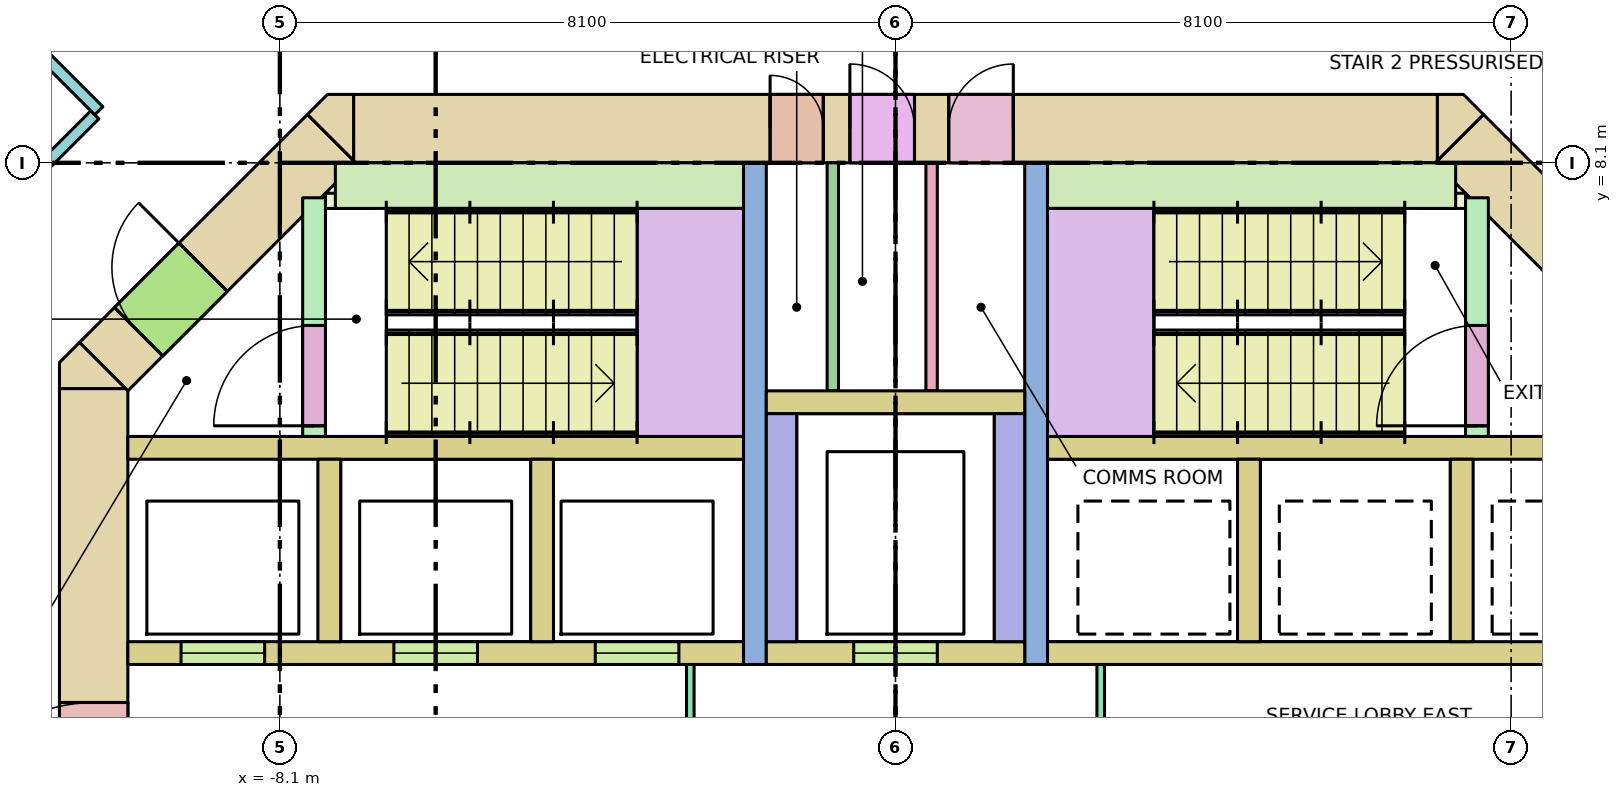
"""IFC4 building model, lengths in metres.
Left out: names, types, materials, properties, quantities, classifications, styles, units other than length and angle.
Written with IfcOpenShell. Run it as: python <this file> out.ifc"""

import sys

from ifc_helpers import new_model, si_unit, direction, frame, frame_2d, origin, place, context, subcontext, project, spatial, polyline, rectangle, outline, extrude, element, fill, save


model = new_model("IFC4")
c1 = context("Model", 3, precision=1e-05, world=origin(), true_north=direction((0.0, 1.0)))
c2 = subcontext(c1, "Body", "Model", "MODEL_VIEW")
j1 = project(units=[si_unit("LENGTHUNIT", "METRE"), si_unit("PLANEANGLEUNIT", "RADIAN")], contexts=[c1])
p1 = place(None, origin())
s1 = spatial("IfcSite", under=j1, at=p1, CompositionType="ELEMENT")
p2 = place(p1, origin())
s2 = spatial("IfcBuilding", under=s1, at=p2, CompositionType="ELEMENT")
p3 = place(p2, frame((0.0, 0.0, 71.0)))
s3 = spatial("IfcBuildingStorey", under=s2, at=p3, CompositionType="ELEMENT", Elevation=71.0)
p4 = place(p3, frame((-7.13, 8.55, -0.28), z_axis=(0.0, 0.0, 1.0), x_axis=(1.0, 0.0, 0.0)))
e1 = element("IfcWall", 1, at=p4, inside=s3, PredefinedType="SHEAR", context=c2, shape_type="SweptSolid", body=[
    extrude(rectangle(XDim=14.26, YDim=0.9, at=frame_2d((7.13, 0.0))), origin(), (0.0, 0.0, 1.0), 4.0),
])
p5 = place(p4, frame((5.48, 0.0, 0.28)))
e2 = element("IfcOpeningElement", 2, at=p5, cuts=e1, PredefinedType="OPENING", context=c2, shape_type="SweptSolid", body=[
    extrude(rectangle(XDim=0.7, YDim=2.1, at=frame_2d((0.35, 1.05))), frame((0.0, 0.46, 0.0), z_axis=(0.0, -1.0, 0.0), x_axis=(1.0, 0.0, 0.0)), (0.0, 0.0, 1.0), 0.92),
])
p6 = place(p4, frame((6.53, 0.0, 0.28)))
e3 = element("IfcOpeningElement", 3, at=p6, cuts=e1, PredefinedType="OPENING", context=c2, shape_type="SweptSolid", body=[
    extrude(rectangle(XDim=0.85, YDim=2.1, at=frame_2d((0.425, 1.05))), frame((0.0, 0.46, 0.0), z_axis=(0.0, -1.0, 0.0), x_axis=(1.0, 0.0, 0.0)), (0.0, 0.0, 1.0), 0.92),
])
p7 = place(p4, frame((7.83, 0.0, 0.28)))
e4 = element("IfcOpeningElement", 4, at=p7, cuts=e1, PredefinedType="OPENING", context=c2, shape_type="SweptSolid", body=[
    extrude(rectangle(XDim=0.85, YDim=2.1, at=frame_2d((0.425, 1.05))), frame((0.0, 0.46, 0.0), z_axis=(0.0, -1.0, 0.0), x_axis=(1.0, 0.0, 0.0)), (0.0, 0.0, 1.0), 0.92),
])
p8 = place(p3, frame((-10.55, -5.13, -0.28), z_axis=(0.0, 0.0, 1.0), x_axis=(0.0, 1.0, 0.0)))
e5 = element("IfcWall", 5, at=p8, inside=s3, PredefinedType="SHEAR", context=c2, shape_type="SweptSolid", body=[
    extrude(rectangle(XDim=10.26, YDim=0.9, at=frame_2d((5.13, 0.0))), origin(), (0.0, 0.0, 1.0), 4.0),
])
p9 = place(p8, frame((4.13, 0.0, 0.28)))
e6 = element("IfcOpeningElement", 6, at=p9, cuts=e5, PredefinedType="OPENING", context=c2, shape_type="SweptSolid", body=[
    extrude(rectangle(XDim=2.0, YDim=2.1, at=frame_2d((1.0, 1.05))), frame((0.0, 0.46, 0.0), z_axis=(0.0, -1.0, 0.0), x_axis=(1.0, 0.0, 0.0)), (0.0, 0.0, 1.0), 0.92),
])
p10 = place(p3, frame((-10.418, 5.418, -0.28), z_axis=(0.0, 0.0, 1.0), x_axis=(0.707106781187, 0.707106781187, 0.0)))
e7 = element("IfcWall", 7, at=p10, inside=s3, PredefinedType="SHEAR", context=c2, shape_type="SweptSolid", body=[
    extrude(rectangle(XDim=4.243, YDim=0.9, at=frame_2d((2.121, 0.0))), origin(), (0.0, 0.0, 1.0), 4.0),
])
p11 = place(p10, frame((0.65, 0.0, 0.28)))
e8 = element("IfcOpeningElement", 8, at=p11, cuts=e7, PredefinedType="OPENING", context=c2, shape_type="SweptSolid", body=[
    extrude(rectangle(XDim=1.2, YDim=2.1, at=frame_2d((0.6, 1.05))), frame((0.0, 0.46, 0.0), z_axis=(0.0, -1.0, 0.0), x_axis=(1.0, 0.0, 0.0)), (0.0, 0.0, 1.0), 0.92),
])
p12 = place(p3, frame((7.418, 8.418, -0.28), z_axis=(0.0, 0.0, 1.0), x_axis=(0.707106781187, -0.707106781187, 0.0)))
e9 = element("IfcWall", 9, at=p12, inside=s3, PredefinedType="SHEAR", context=c2, shape_type="SweptSolid", body=[
    extrude(rectangle(XDim=4.243, YDim=0.9, at=frame_2d((2.121, 0.0))), origin(), (0.0, 0.0, 1.0), 4.0),
])
p13 = place(p12, frame((2.393, 0.0, 0.28)))
e10 = element("IfcOpeningElement", 10, at=p13, cuts=e9, PredefinedType="OPENING", context=c2, shape_type="SweptSolid", body=[
    extrude(rectangle(XDim=1.2, YDim=2.1, at=frame_2d((0.6, 1.05))), frame((0.0, 0.46, 0.0), z_axis=(0.0, -1.0, 0.0), x_axis=(1.0, 0.0, 0.0)), (0.0, 0.0, 1.0), 0.92),
])
p14 = place(p3, frame((0.0, 0.0, -0.28)))
e11 = element("IfcWall", 11, at=p14, inside=s3, PredefinedType="SHEAR", context=c2, shape_type="SweptSolid", body=[
    extrude(outline(polyline([(-10.736, 5.736), (-10.13, 5.13), (-11.0, 5.13), (-11.0, 5.473), (-10.736, 5.736)])), origin(), (0.0, 0.0, 1.0), 4.0),
])
p15 = place(p3, frame((0.0, 0.0, -0.28)))
e12 = element("IfcWall", 12, at=p15, inside=s3, PredefinedType="SHEAR", context=c2, shape_type="SweptSolid", body=[
    extrude(outline(polyline([(-7.473, 9.0), (-7.13, 9.0), (-7.13, 8.13), (-7.736, 8.736), (-7.473, 9.0)])), origin(), (0.0, 0.0, 1.0), 4.0),
])
p16 = place(p3, frame((0.0, 0.0, -0.28)))
e13 = element("IfcWall", 13, at=p16, inside=s3, PredefinedType="SHEAR", context=c2, shape_type="SweptSolid", body=[
    extrude(outline(polyline([(7.473, 9.0), (7.736, 8.736), (7.13, 8.13), (7.13, 9.0), (7.473, 9.0)])), origin(), (0.0, 0.0, 1.0), 4.0),
])
for number, where, z_axis, x_axis in (
    (14, (-10.1, 4.35, 0.0), (0.0, 0.0, 1.0), (1.0, 0.0, 0.0)),
    (15, (2.0, 4.35, 0.0), (0.0, 0.0, 1.0), (1.0, 0.0, 0.0)),
):
    element("IfcWall", number, at=place(p3, frame(where, z_axis=z_axis, x_axis=x_axis)), inside=s3, PredefinedType="SOLIDWALL", context=c2, shape_type="SweptSolid", body=[
        extrude(rectangle(XDim=8.1, YDim=0.3, at=frame_2d((4.05, 0.0))), origin(), (0.0, 0.0, 1.0), 3.72),
    ])
p17 = place(p3, frame((-10.1, 1.65, 0.0), z_axis=(0.0, 0.0, 1.0), x_axis=(1.0, 0.0, 0.0)))
e16 = element("IfcWall", 16, at=p17, inside=s3, PredefinedType="SOLIDWALL", context=c2, shape_type="SweptSolid", body=[
    extrude(rectangle(XDim=8.1, YDim=0.3, at=frame_2d((4.05, 0.0))), origin(), (0.0, 0.0, 1.0), 3.72),
])
p18 = place(p17, frame((0.7, 0.0, 0.0)))
e17 = element("IfcOpeningElement", 17, at=p18, cuts=e16, PredefinedType="OPENING", context=c2, shape_type="SweptSolid", body=[
    extrude(rectangle(XDim=1.1, YDim=2.1, at=frame_2d((0.55, 1.05))), frame((0.0, 0.16, 0.0), z_axis=(0.0, -1.0, 0.0), x_axis=(1.0, 0.0, 0.0)), (0.0, 0.0, 1.0), 0.32),
])
p19 = place(p17, frame((3.5, 0.0, 0.0)))
e18 = element("IfcOpeningElement", 18, at=p19, cuts=e16, PredefinedType="OPENING", context=c2, shape_type="SweptSolid", body=[
    extrude(rectangle(XDim=1.1, YDim=2.1, at=frame_2d((0.55, 1.05))), frame((0.0, 0.16, 0.0), z_axis=(0.0, -1.0, 0.0), x_axis=(1.0, 0.0, 0.0)), (0.0, 0.0, 1.0), 0.32),
])
p20 = place(p17, frame((6.15, 0.0, 0.0)))
e19 = element("IfcOpeningElement", 19, at=p20, cuts=e16, PredefinedType="OPENING", context=c2, shape_type="SweptSolid", body=[
    extrude(rectangle(XDim=1.1, YDim=2.1, at=frame_2d((0.55, 1.05))), frame((0.0, 0.16, 0.0), z_axis=(0.0, -1.0, 0.0), x_axis=(1.0, 0.0, 0.0)), (0.0, 0.0, 1.0), 0.32),
])
p21 = place(p3, frame((2.0, 1.65, 0.0), z_axis=(0.0, 0.0, 1.0), x_axis=(1.0, 0.0, 0.0)))
e20 = element("IfcWall", 20, at=p21, inside=s3, PredefinedType="SOLIDWALL", context=c2, shape_type="SweptSolid", body=[
    extrude(rectangle(XDim=8.1, YDim=0.3, at=frame_2d((4.05, 0.0))), origin(), (0.0, 0.0, 1.0), 3.72),
])
for number, where, z_axis, x_axis in (
    (21, (-7.45, 1.8, 0.0), (0.0, 0.0, 1.0), (0.0, 1.0, 0.0)),
    (22, (-4.65, 1.8, 0.0), (0.0, 0.0, 1.0), (0.0, 1.0, 0.0)),
    (23, (4.65, 1.8, 0.0), (0.0, 0.0, 1.0), (0.0, 1.0, 0.0)),
    (24, (7.45, 1.8, 0.0), (0.0, 0.0, 1.0), (0.0, 1.0, 0.0)),
):
    element("IfcWall", number, at=place(p3, frame(where, z_axis=z_axis, x_axis=x_axis)), inside=s3, PredefinedType="SOLIDWALL", context=c2, shape_type="SweptSolid", body=[
        extrude(rectangle(XDim=2.4, YDim=0.3, at=frame_2d((1.2, 0.0))), origin(), (0.0, 0.0, 1.0), 3.72),
    ])
for number, where, z_axis, x_axis in (
    (25, (-1.85, 1.5, 0.0), (0.0, 0.0, 1.0), (0.0, 1.0, 0.0)),
    (26, (1.85, 1.5, 0.0), (0.0, 0.0, 1.0), (0.0, 1.0, 0.0)),
):
    element("IfcWall", number, at=place(p3, frame(where, z_axis=z_axis, x_axis=x_axis)), inside=s3, PredefinedType="SHEAR", context=c2, shape_type="SweptSolid", body=[
        extrude(rectangle(XDim=6.6, YDim=0.3, at=frame_2d((3.3, 0.0))), origin(), (0.0, 0.0, 1.0), 3.72),
    ])
p22 = place(p3, frame((-1.7, 1.65, 0.0), z_axis=(0.0, 0.0, 1.0), x_axis=(1.0, 0.0, 0.0)))
e27 = element("IfcWall", 27, at=p22, inside=s3, PredefinedType="SOLIDWALL", context=c2, shape_type="SweptSolid", body=[
    extrude(rectangle(XDim=3.4, YDim=0.3, at=frame_2d((1.7, 0.0))), origin(), (0.0, 0.0, 1.0), 3.72),
])
p23 = place(p22, frame((1.15, 0.0, 0.0)))
e28 = element("IfcOpeningElement", 28, at=p23, cuts=e27, PredefinedType="OPENING", context=c2, shape_type="SweptSolid", body=[
    extrude(rectangle(XDim=1.1, YDim=2.1, at=frame_2d((0.55, 1.05))), frame((0.0, 0.16, 0.0), z_axis=(0.0, -1.0, 0.0), x_axis=(1.0, 0.0, 0.0)), (0.0, 0.0, 1.0), 0.32),
])
for number, where, z_axis, x_axis in (
    (29, (-1.5, 1.8, 0.0), (0.0, 0.0, 1.0), (0.0, 1.0, 0.0)),
    (30, (1.5, 1.8, 0.0), (0.0, 0.0, 1.0), (0.0, 1.0, 0.0)),
):
    element("IfcWall", number, at=place(p3, frame(where, z_axis=z_axis, x_axis=x_axis)), inside=s3, PredefinedType="SOLIDWALL", context=c2, shape_type="SweptSolid", body=[
        extrude(rectangle(XDim=3.0, YDim=0.4, at=frame_2d((1.5, 0.0))), origin(), (0.0, 0.0, 1.0), 3.72),
    ])
p24 = place(p3, frame((-1.7, 4.95, 0.0), z_axis=(0.0, 0.0, 1.0), x_axis=(1.0, 0.0, 0.0)))
e31 = element("IfcWall", 31, at=p24, inside=s3, PredefinedType="SOLIDWALL", context=c2, shape_type="SweptSolid", body=[
    extrude(rectangle(XDim=3.4, YDim=0.3, at=frame_2d((1.7, 0.0))), origin(), (0.0, 0.0, 1.0), 3.72),
])
p25 = place(p3, frame((-7.65, 4.5, 0.0), z_axis=(0.0, 0.0, 1.0), x_axis=(0.0, 1.0, 0.0)))
e32 = element("IfcWall", 32, at=p25, inside=s3, PredefinedType="SHEAR", context=c2, shape_type="SweptSolid", body=[
    extrude(rectangle(XDim=3.14, YDim=0.3, at=frame_2d((1.57, 0.0))), origin(), (0.0, 0.0, 1.0), 3.72),
])
p26 = place(p25, frame((0.14, 0.0, 0.0)))
e33 = element("IfcOpeningElement", 33, at=p26, cuts=e32, PredefinedType="OPENING", context=c2, shape_type="SweptSolid", body=[
    extrude(rectangle(XDim=1.32, YDim=2.1, at=frame_2d((0.66, 1.05))), frame((0.0, 0.16, 0.0), z_axis=(0.0, -1.0, 0.0), x_axis=(1.0, 0.0, 0.0)), (0.0, 0.0, 1.0), 0.32),
])
p27 = place(p3, frame((-7.37, 7.8, 0.0), z_axis=(0.0, 0.0, 1.0), x_axis=(1.0, 0.0, 0.0)))
e34 = element("IfcWall", 34, at=p27, inside=s3, PredefinedType="SHEAR", context=c2, shape_type="SweptSolid", body=[
    extrude(rectangle(XDim=5.37, YDim=0.6, at=frame_2d((2.685, 0.0))), origin(), (0.0, 0.0, 1.0), 3.72),
])
p28 = place(p3, frame((7.65, 4.5, 0.0), z_axis=(0.0, 0.0, 1.0), x_axis=(0.0, 1.0, 0.0)))
e35 = element("IfcWall", 35, at=p28, inside=s3, PredefinedType="SHEAR", context=c2, shape_type="SweptSolid", body=[
    extrude(rectangle(XDim=3.14, YDim=0.3, at=frame_2d((1.57, 0.0))), origin(), (0.0, 0.0, 1.0), 3.72),
])
p29 = place(p28, frame((0.14, 0.0, 0.0)))
e36 = element("IfcOpeningElement", 36, at=p29, cuts=e35, PredefinedType="OPENING", context=c2, shape_type="SweptSolid", body=[
    extrude(rectangle(XDim=1.32, YDim=2.1, at=frame_2d((0.66, 1.05))), frame((0.0, 0.16, 0.0), z_axis=(0.0, -1.0, 0.0), x_axis=(1.0, 0.0, 0.0)), (0.0, 0.0, 1.0), 0.32),
])
p30 = place(p3, frame((2.0, 7.8, 0.0), z_axis=(0.0, 0.0, 1.0), x_axis=(1.0, 0.0, 0.0)))
e37 = element("IfcWall", 37, at=p30, inside=s3, PredefinedType="SHEAR", context=c2, shape_type="SweptSolid", body=[
    extrude(rectangle(XDim=5.37, YDim=0.6, at=frame_2d((2.685, 0.0))), origin(), (0.0, 0.0, 1.0), 3.72),
])
for number, where, z_axis, x_axis in (
    (38, (-7.5, 7.6, 0.0), (0.0, 0.0, 1.0), (1.0, 0.0, 0.0)),
    (39, (6.9, 7.6, 0.0), (0.0, 0.0, 1.0), (1.0, 0.0, 0.0)),
):
    element("IfcWall", number, at=place(p3, frame(where, z_axis=z_axis, x_axis=x_axis)), inside=s3, PredefinedType="SHEAR", context=c2, shape_type="SweptSolid", body=[
        extrude(rectangle(XDim=0.6, YDim=0.2, at=frame_2d((0.3, 0.0))), origin(), (0.0, 0.0, 1.0), 3.72),
    ])
p31 = place(p3, frame((-2.7, -1.5, 0.0), z_axis=(0.0, 0.0, 1.0), x_axis=(0.0, 1.0, 0.0)))
e40 = element("IfcWall", 40, at=p31, inside=s3, PredefinedType="PARTITIONING", context=c2, shape_type="SweptSolid", body=[
    extrude(rectangle(XDim=3.0, YDim=0.1, at=frame_2d((1.5, 0.0))), origin(), (0.0, 0.0, 1.0), 3.72),
])
p32 = place(p31, frame((0.9, 0.0, 0.0)))
e41 = element("IfcOpeningElement", 41, at=p32, cuts=e40, PredefinedType="OPENING", context=c2, shape_type="SweptSolid", body=[
    extrude(rectangle(XDim=1.2, YDim=2.1, at=frame_2d((0.6, 1.05))), frame((0.0, 0.06, 0.0), z_axis=(0.0, -1.0, 0.0), x_axis=(1.0, 0.0, 0.0)), (0.0, 0.0, 1.0), 0.12),
])
p33 = place(p3, frame((2.7, -1.5, 0.0), z_axis=(0.0, 0.0, 1.0), x_axis=(0.0, 1.0, 0.0)))
e42 = element("IfcWall", 42, at=p33, inside=s3, PredefinedType="PARTITIONING", context=c2, shape_type="SweptSolid", body=[
    extrude(rectangle(XDim=3.0, YDim=0.1, at=frame_2d((1.5, 0.0))), origin(), (0.0, 0.0, 1.0), 3.72),
])
p34 = place(p33, frame((0.9, 0.0, 0.0)))
e43 = element("IfcOpeningElement", 43, at=p34, cuts=e42, PredefinedType="OPENING", context=c2, shape_type="SweptSolid", body=[
    extrude(rectangle(XDim=1.2, YDim=2.1, at=frame_2d((0.6, 1.05))), frame((0.0, 0.06, 0.0), z_axis=(0.0, -1.0, 0.0), x_axis=(1.0, 0.0, 0.0)), (0.0, 0.0, 1.0), 0.12),
])
for number, where, z_axis, x_axis in (
    (44, (-0.825, 5.1, 0.0), (0.0, 0.0, 1.0), (0.0, 1.0, 0.0)),
    (45, (0.475, 5.1, 0.0), (0.0, 0.0, 1.0), (0.0, 1.0, 0.0)),
):
    element("IfcWall", number, at=place(p3, frame(where, z_axis=z_axis, x_axis=x_axis)), inside=s3, PredefinedType="PARTITIONING", context=c2, shape_type="SweptSolid", body=[
        extrude(rectangle(XDim=3.0, YDim=0.15, at=frame_2d((1.5, 0.0))), origin(), (0.0, 0.0, 1.0), 3.72),
    ])
p35 = place(p3, frame((-12.938, 6.328, 0.0), z_axis=(0.0, 0.0, 1.0), x_axis=(0.707106781187, 0.707106781187, 0.0)))
e46 = element("IfcWall", 46, at=p35, inside=s3, PredefinedType="PARTITIONING", context=c2, shape_type="SweptSolid", body=[
    extrude(rectangle(XDim=3.399, YDim=0.15, at=frame_2d((1.7, 0.0))), origin(), (0.0, 0.0, 1.0), 2.82),
])
p36 = place(p3, frame((-10.481, 8.784, 0.0), z_axis=(0.0, 0.0, 1.0), x_axis=(-0.707124155885, 0.707089406061, 0.0)))
e47 = element("IfcWall", 47, at=p36, inside=s3, PredefinedType="PARTITIONING", context=c2, shape_type="SweptSolid", body=[
    extrude(rectangle(XDim=7.026, YDim=0.15, at=frame_2d((3.513, 0.0))), origin(), (0.0, 0.0, 1.0), 3.72),
])
p37 = place(p36, frame((2.613, 0.0, 0.0)))
e48 = element("IfcOpeningElement", 48, at=p37, cuts=e47, PredefinedType="OPENING", context=c2, shape_type="SweptSolid", body=[
    extrude(rectangle(XDim=1.8, YDim=2.1, at=frame_2d((0.9, 1.05))), frame((0.0, 0.085, 0.0), z_axis=(0.0, -1.0, 0.0), x_axis=(1.0, 0.0, 0.0)), (0.0, 0.0, 1.0), 0.17),
])
p38 = place(p3, frame((8.328, 10.938, 0.0), z_axis=(0.0, 0.0, 1.0), x_axis=(0.707125355289, -0.707088206597, 0.0)))
e49 = element("IfcWall", 49, at=p38, inside=s3, PredefinedType="PARTITIONING", context=c2, shape_type="SweptSolid", body=[
    extrude(rectangle(XDim=6.572, YDim=0.15, at=frame_2d((3.286, 0.0))), origin(), (0.0, 0.0, 1.0), 2.82),
])
p39 = place(p18, origin())
e50 = element("IfcDoor", 50, at=p39, inside=s3, OperationType="DOUBLE_DOOR_SLIDING", PredefinedType="DOOR", context=c2, shape_type="SweptSolid", body=[
    extrude(rectangle(XDim=1.1, YDim=2.1, at=frame_2d((0.55, 1.05))), frame((0.0, 0.025, 0.0), z_axis=(0.0, -1.0, 0.0), x_axis=(1.0, 0.0, 0.0)), (0.0, 0.0, 1.0), 0.05),
])
fill(e17, e50)
p40 = place(p19, origin())
e51 = element("IfcDoor", 51, at=p40, inside=s3, OperationType="DOUBLE_DOOR_SLIDING", PredefinedType="DOOR", context=c2, shape_type="SweptSolid", body=[
    extrude(rectangle(XDim=1.1, YDim=2.1, at=frame_2d((0.55, 1.05))), frame((0.0, 0.025, 0.0), z_axis=(0.0, -1.0, 0.0), x_axis=(1.0, 0.0, 0.0)), (0.0, 0.0, 1.0), 0.05),
])
fill(e18, e51)
p41 = place(p20, origin())
e52 = element("IfcDoor", 52, at=p41, inside=s3, OperationType="DOUBLE_DOOR_SLIDING", PredefinedType="DOOR", context=c2, shape_type="SweptSolid", body=[
    extrude(rectangle(XDim=1.1, YDim=2.1, at=frame_2d((0.55, 1.05))), frame((0.0, 0.025, 0.0), z_axis=(0.0, -1.0, 0.0), x_axis=(1.0, 0.0, 0.0)), (0.0, 0.0, 1.0), 0.05),
])
fill(e19, e52)
p42 = place(p23, origin())
e53 = element("IfcDoor", 53, at=p42, inside=s3, OperationType="DOUBLE_DOOR_SLIDING", PredefinedType="DOOR", context=c2, shape_type="SweptSolid", body=[
    extrude(rectangle(XDim=1.1, YDim=2.1, at=frame_2d((0.55, 1.05))), frame((0.0, 0.025, 0.0), z_axis=(0.0, -1.0, 0.0), x_axis=(1.0, 0.0, 0.0)), (0.0, 0.0, 1.0), 0.05),
])
fill(e28, e53)
p43 = place(p26, origin())
e54 = element("IfcDoor", 54, at=p43, inside=s3, OperationType="DOUBLE_DOOR_SINGLE_SWING", PredefinedType="DOOR", context=c2, shape_type="SweptSolid", body=[
    extrude(rectangle(XDim=1.32, YDim=2.1, at=frame_2d((0.66, 1.05))), frame((0.0, 0.025, 0.0), z_axis=(0.0, -1.0, 0.0), x_axis=(1.0, 0.0, 0.0)), (0.0, 0.0, 1.0), 0.05),
])
fill(e33, e54)
p44 = place(p11, origin())
e55 = element("IfcDoor", 55, at=p44, inside=s3, OperationType="SINGLE_SWING_RIGHT", PredefinedType="DOOR", context=c2, shape_type="SweptSolid", body=[
    extrude(rectangle(XDim=1.2, YDim=2.1, at=frame_2d((0.6, 1.05))), frame((0.0, 0.025, 0.0), z_axis=(0.0, -1.0, 0.0), x_axis=(1.0, 0.0, 0.0)), (0.0, 0.0, 1.0), 0.05),
])
fill(e8, e55)
p45 = place(p29, origin())
e56 = element("IfcDoor", 56, at=p45, inside=s3, OperationType="DOUBLE_DOOR_SINGLE_SWING", PredefinedType="DOOR", context=c2, shape_type="SweptSolid", body=[
    extrude(rectangle(XDim=1.32, YDim=2.1, at=frame_2d((0.66, 1.05))), frame((0.0, 0.025, 0.0), z_axis=(0.0, -1.0, 0.0), x_axis=(1.0, 0.0, 0.0)), (0.0, 0.0, 1.0), 0.05),
])
fill(e36, e56)
p46 = place(p9, origin())
e57 = element("IfcDoor", 57, at=p46, inside=s3, OperationType="DOUBLE_DOOR_SINGLE_SWING", PredefinedType="DOOR", context=c2, shape_type="SweptSolid", body=[
    extrude(rectangle(XDim=2.0, YDim=2.1, at=frame_2d((1.0, 1.05))), frame((0.0, 0.025, 0.0), z_axis=(0.0, -1.0, 0.0), x_axis=(1.0, 0.0, 0.0)), (0.0, 0.0, 1.0), 0.05),
])
fill(e6, e57)
p47 = place(p5, origin())
e58 = element("IfcDoor", 58, at=p47, inside=s3, OperationType="SINGLE_SWING_LEFT", PredefinedType="DOOR", context=c2, shape_type="SweptSolid", body=[
    extrude(rectangle(XDim=0.7, YDim=2.1, at=frame_2d((0.35, 1.05))), frame((0.0, 0.025, 0.0), z_axis=(0.0, -1.0, 0.0), x_axis=(1.0, 0.0, 0.0)), (0.0, 0.0, 1.0), 0.05),
])
fill(e2, e58)
p48 = place(p6, origin())
e59 = element("IfcDoor", 59, at=p48, inside=s3, OperationType="SINGLE_SWING_LEFT", PredefinedType="DOOR", context=c2, shape_type="SweptSolid", body=[
    extrude(rectangle(XDim=0.85, YDim=2.1, at=frame_2d((0.425, 1.05))), frame((0.0, 0.025, 0.0), z_axis=(0.0, -1.0, 0.0), x_axis=(1.0, 0.0, 0.0)), (0.0, 0.0, 1.0), 0.05),
])
fill(e3, e59)
p49 = place(p7, origin())
e60 = element("IfcDoor", 60, at=p49, inside=s3, OperationType="SINGLE_SWING_RIGHT", PredefinedType="DOOR", context=c2, shape_type="SweptSolid", body=[
    extrude(rectangle(XDim=0.85, YDim=2.1, at=frame_2d((0.425, 1.05))), frame((0.0, 0.025, 0.0), z_axis=(0.0, -1.0, 0.0), x_axis=(1.0, 0.0, 0.0)), (0.0, 0.0, 1.0), 0.05),
])
fill(e4, e60)
save(model, sys.argv[1])
